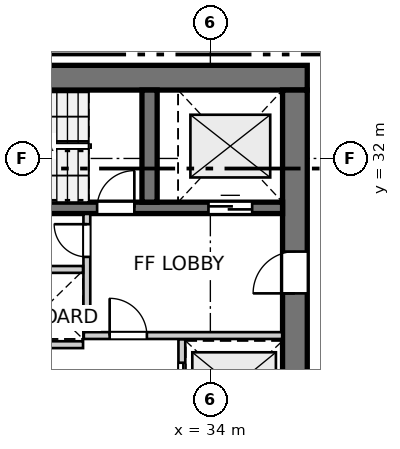
"""IFC4 building model, lengths in metres.
Left out: names, types, materials, properties, quantities, classifications, styles, units other than length and angle.
Written with IfcOpenShell. Run it as: python <this file> out.ifc"""

import sys

from ifc_helpers import new_model, si_unit, direction, frame, frame_2d, origin, place, context, subcontext, project, spatial, rectangle, extrude, source, transform, mapped, element, fill, save


model = new_model("IFC4")
c1 = context("Model", 3, precision=1e-05, world=origin(), true_north=direction((0.0, 1.0)))
c2 = subcontext(c1, "Body", "Model", "MODEL_VIEW")
j1 = project(units=[si_unit("LENGTHUNIT", "METRE"), si_unit("PLANEANGLEUNIT", "RADIAN")], contexts=[c1])
p1 = place(None, origin())
s1 = spatial("IfcSite", under=j1, at=p1, CompositionType="ELEMENT")
p2 = place(p1, origin())
s2 = spatial("IfcBuilding", under=s1, at=p2, CompositionType="ELEMENT")
p3 = place(p2, frame((0.0, 0.0, 80.0)))
s3 = spatial("IfcBuildingStorey", under=s2, at=p3, CompositionType="ELEMENT", Elevation=80.0)
p4 = place(p3, frame((36.55, 34.125, 0.0), z_axis=(0.0, 0.0, 1.0), x_axis=(-1.0, 0.0, 0.0)))
e1 = element("IfcWall", 1, at=p4, inside=s3, PredefinedType="SHEAR", context=c2, shape_type="SweptSolid", body=[
    extrude(rectangle(XDim=12.4, YDim=0.65, at=frame_2d((6.2, 0.0))), origin(), (0.0, 0.0, 1.0), 2.935),
])
p5 = place(p3, frame((36.225, 18.2, 0.0), z_axis=(0.0, 0.0, 1.0), x_axis=(0.0, 1.0, 0.0)))
e2 = element("IfcWall", 2, at=p5, inside=s3, PredefinedType="SHEAR", context=c2, shape_type="SweptSolid", body=[
    extrude(rectangle(XDim=15.6, YDim=0.65, at=frame_2d((7.8, 0.0))), origin(), (0.0, 0.0, 1.0), 2.935),
])
p6 = place(p5, frame((4.25, 0.0, 0.0)))
e3 = element("IfcOpeningElement", 3, at=p6, cuts=e2, PredefinedType="OPENING", context=c2, shape_type="SweptSolid", body=[
    extrude(rectangle(XDim=1.1, YDim=2.15, at=frame_2d((0.55, 1.075))), frame((0.0, 0.335, 0.0), z_axis=(0.0, -1.0, 0.0), x_axis=(1.0, 0.0, 0.0)), (0.0, 0.0, 1.0), 0.67),
])
p7 = place(p5, frame((10.25, 0.0, 0.0)))
e4 = element("IfcOpeningElement", 4, at=p7, cuts=e2, PredefinedType="OPENING", context=c2, shape_type="SweptSolid", body=[
    extrude(rectangle(XDim=1.1, YDim=2.15, at=frame_2d((0.55, 1.075))), frame((0.0, 0.335, 0.0), z_axis=(0.0, -1.0, 0.0), x_axis=(1.0, 0.0, 0.0)), (0.0, 0.0, 1.0), 0.67),
])
p8 = place(p3, frame((24.8, 30.7, 0.0), z_axis=(0.0, 0.0, 1.0), x_axis=(1.0, 0.0, 0.0)))
e5 = element("IfcWall", 5, at=p8, inside=s3, PredefinedType="SHEAR", context=c2, shape_type="SweptSolid", body=[
    extrude(rectangle(XDim=11.1, YDim=0.3, at=frame_2d((5.55, 0.0))), origin(), (0.0, 0.0, 1.0), 2.935),
])
p9 = place(p8, frame((6.22, 0.0, 0.0)))
e6 = element("IfcOpeningElement", 6, at=p9, cuts=e5, PredefinedType="OPENING", context=c2, shape_type="SweptSolid", body=[
    extrude(rectangle(XDim=0.98, YDim=2.15, at=frame_2d((0.49, 1.075))), frame((0.0, 0.16, 0.0), z_axis=(0.0, -1.0, 0.0), x_axis=(1.0, 0.0, 0.0)), (0.0, 0.0, 1.0), 0.32),
])
p10 = place(p8, frame((9.15, 0.0, 0.0)))
e7 = element("IfcOpeningElement", 7, at=p10, cuts=e5, PredefinedType="OPENING", context=c2, shape_type="SweptSolid", body=[
    extrude(rectangle(XDim=1.15, YDim=2.15, at=frame_2d((0.575, 1.075))), frame((0.0, 0.16, 0.0), z_axis=(0.0, -1.0, 0.0), x_axis=(1.0, 0.0, 0.0)), (0.0, 0.0, 1.0), 0.32),
])
p11 = place(p3, frame((32.4, 30.85, 0.0), z_axis=(0.0, 0.0, 1.0), x_axis=(0.0, 1.0, 0.0)))
e8 = element("IfcWall", 8, at=p11, inside=s3, PredefinedType="SHEAR", context=c2, shape_type="SweptSolid", body=[
    extrude(rectangle(XDim=2.95, YDim=0.4, at=frame_2d((1.475, 0.0))), origin(), (0.0, 0.0, 1.0), 2.935),
])
p12 = place(p3, frame((30.75, 27.43, 0.0), z_axis=(0.0, 0.0, 1.0), x_axis=(0.0, 1.0, 0.0)))
e9 = element("IfcWall", 9, at=p12, inside=s3, PredefinedType="PARTITIONING", context=c2, shape_type="SweptSolid", body=[
    extrude(rectangle(XDim=3.11, YDim=0.18, at=frame_2d((1.555, 0.0))), origin(), (0.0, 0.0, 1.0), 2.935),
])
p13 = place(p12, frame((1.98, 0.0, 0.0)))
e10 = element("IfcOpeningElement", 10, at=p13, cuts=e9, PredefinedType="OPENING", context=c2, shape_type="SweptSolid", body=[
    extrude(rectangle(XDim=0.86, YDim=2.05, at=frame_2d((0.43, 1.025))), frame((0.0, 0.1, 0.0), z_axis=(0.0, -1.0, 0.0), x_axis=(1.0, 0.0, 0.0)), (0.0, 0.0, 1.0), 0.2),
])
p14 = place(p3, frame((30.67, 27.34, 0.0), z_axis=(0.0, 0.0, 1.0), x_axis=(1.0, 0.0, 0.0)))
e11 = element("IfcWall", 11, at=p14, inside=s3, PredefinedType="PARTITIONING", context=c2, shape_type="SweptSolid", body=[
    extrude(rectangle(XDim=5.22, YDim=0.18, at=frame_2d((2.61, 0.0))), origin(), (0.0, 0.0, 1.0), 2.935),
])
p15 = place(p14, frame((0.68, 0.0, 0.0)))
e12 = element("IfcOpeningElement", 12, at=p15, cuts=e11, PredefinedType="OPENING", context=c2, shape_type="SweptSolid", body=[
    extrude(rectangle(XDim=0.98, YDim=2.15, at=frame_2d((0.49, 1.075))), frame((0.0, 0.1, 0.0), z_axis=(0.0, -1.0, 0.0), x_axis=(1.0, 0.0, 0.0)), (0.0, 0.0, 1.0), 0.2),
])
p16 = place(p3, frame((33.25, 24.76, 0.0), z_axis=(0.0, 0.0, 1.0), x_axis=(0.0, 1.0, 0.0)))
e13 = element("IfcWall", 13, at=p16, inside=s3, PredefinedType="PARTITIONING", context=c2, shape_type="SweptSolid", body=[
    extrude(rectangle(XDim=2.48, YDim=0.18, at=frame_2d((1.24, 0.0))), origin(), (0.0, 0.0, 1.0), 2.935),
])
p17 = place(p16, frame((0.615, 0.0, 0.0)))
e14 = element("IfcOpeningElement", 14, at=p17, cuts=e13, PredefinedType="OPENING", context=c2, shape_type="SweptSolid", body=[
    extrude(rectangle(XDim=1.25, YDim=2.15, at=frame_2d((0.625, 1.075))), frame((0.0, 0.1, 0.0), z_axis=(0.0, -1.0, 0.0), x_axis=(1.0, 0.0, 0.0)), (0.0, 0.0, 1.0), 0.2),
])
p18 = place(p3, frame((24.81, 29.08, 0.0), z_axis=(0.0, 0.0, 1.0), x_axis=(1.0, 0.0, 0.0)))
e15 = element("IfcWall", 15, at=p18, inside=s3, PredefinedType="PARTITIONING", context=c2, shape_type="SweptSolid", body=[
    extrude(rectangle(XDim=5.84, YDim=0.18, at=frame_2d((2.92, 0.0))), origin(), (0.0, 0.0, 1.0), 2.935),
])
p19 = place(p3, frame((28.825, 27.1, 0.0), z_axis=(0.0, 0.0, 1.0), x_axis=(1.0, 0.0, 0.0)))
e16 = element("IfcWall", 16, at=p19, inside=s3, PredefinedType="PARTITIONING", context=c2, shape_type="SweptSolid", body=[
    extrude(rectangle(XDim=1.825, YDim=0.18, at=frame_2d((0.913, 0.0))), origin(), (0.0, 0.0, 1.0), 2.935),
])
m1 = source(origin(), c2, "Body", "SweptSolid", [
    extrude(rectangle(XDim=0.98, YDim=2.15, at=frame_2d((0.49, 1.075))), frame((0.0, 0.025, 0.0), z_axis=(0.0, -1.0, 0.0), x_axis=(1.0, 0.0, 0.0)), (0.0, 0.0, 1.0), 0.05),
])
p20 = place(p9, origin())
e17 = element("IfcDoor", 17, at=p20, inside=s3, OperationType="SINGLE_SWING_RIGHT", PredefinedType="DOOR", context=c2, shape_type="MappedRepresentation", body=[
    mapped(m1, transform((0.0, 0.0, 0.0), x_axis=(1.0, 0.0, 0.0), y_axis=(0.0, 1.0, 0.0), z_axis=(0.0, 0.0, 1.0), scale=1.0)),
])
fill(e6, e17)
m2 = source(origin(), c2, "Body", "SweptSolid", [
    extrude(rectangle(XDim=1.15, YDim=2.15, at=frame_2d((0.575, 1.075))), frame((0.0, 0.025, 0.0), z_axis=(0.0, -1.0, 0.0), x_axis=(1.0, 0.0, 0.0)), (0.0, 0.0, 1.0), 0.05),
])
p21 = place(p10, origin())
e18 = element("IfcDoor", 18, at=p21, inside=s3, OperationType="DOUBLE_DOOR_SLIDING", PredefinedType="DOOR", context=c2, shape_type="MappedRepresentation", body=[
    mapped(m2, transform((0.0, 0.0, 0.0), x_axis=(1.0, 0.0, 0.0), y_axis=(0.0, 1.0, 0.0), z_axis=(0.0, 0.0, 1.0), scale=1.0)),
])
fill(e7, e18)
m3 = source(origin(), c2, "Body", "SweptSolid", [
    extrude(rectangle(XDim=1.1, YDim=2.15, at=frame_2d((0.55, 1.075))), frame((0.0, 0.025, 0.0), z_axis=(0.0, -1.0, 0.0), x_axis=(1.0, 0.0, 0.0)), (0.0, 0.0, 1.0), 0.05),
])
p22 = place(p7, origin())
e19 = element("IfcDoor", 19, at=p22, inside=s3, OperationType="SINGLE_SWING_LEFT", PredefinedType="DOOR", context=c2, shape_type="MappedRepresentation", body=[
    mapped(m3, transform((0.0, 0.0, 0.0), x_axis=(1.0, 0.0, 0.0), y_axis=(0.0, 1.0, 0.0), z_axis=(0.0, 0.0, 1.0), scale=1.0)),
])
fill(e4, e19)
m4 = source(origin(), c2, "Body", "SweptSolid", [
    extrude(rectangle(XDim=0.86, YDim=2.05, at=frame_2d((0.43, 1.025))), frame((0.0, 0.025, 0.0), z_axis=(0.0, -1.0, 0.0), x_axis=(1.0, 0.0, 0.0)), (0.0, 0.0, 1.0), 0.05),
])
p23 = place(p13, origin())
e20 = element("IfcDoor", 20, at=p23, inside=s3, OperationType="SINGLE_SWING_RIGHT", PredefinedType="DOOR", context=c2, shape_type="MappedRepresentation", body=[
    mapped(m4, transform((0.0, 0.0, 0.0), x_axis=(1.0, 0.0, 0.0), y_axis=(0.0, 1.0, 0.0), z_axis=(0.0, 0.0, 1.0), scale=1.0)),
])
fill(e10, e20)
p24 = place(p15, origin())
e21 = element("IfcDoor", 21, at=p24, inside=s3, OperationType="SINGLE_SWING_LEFT", PredefinedType="DOOR", context=c2, shape_type="MappedRepresentation", body=[
    mapped(m1, transform((0.0, 0.0, 0.0), x_axis=(1.0, 0.0, 0.0), y_axis=(0.0, 1.0, 0.0), z_axis=(0.0, 0.0, 1.0), scale=1.0)),
])
fill(e12, e21)
m5 = source(origin(), c2, "Body", "SweptSolid", [
    extrude(rectangle(XDim=1.25, YDim=2.15, at=frame_2d((0.625, 1.075))), frame((0.0, 0.025, 0.0), z_axis=(0.0, -1.0, 0.0), x_axis=(1.0, 0.0, 0.0)), (0.0, 0.0, 1.0), 0.05),
])
p25 = place(p17, origin())
e22 = element("IfcDoor", 22, at=p25, inside=s3, OperationType="DOUBLE_DOOR_SLIDING", PredefinedType="DOOR", context=c2, shape_type="MappedRepresentation", body=[
    mapped(m5, transform((0.0, 0.0, 0.0), x_axis=(1.0, 0.0, 0.0), y_axis=(0.0, 1.0, 0.0), z_axis=(0.0, 0.0, 1.0), scale=1.0)),
])
fill(e14, e22)
save(model, sys.argv[1])
